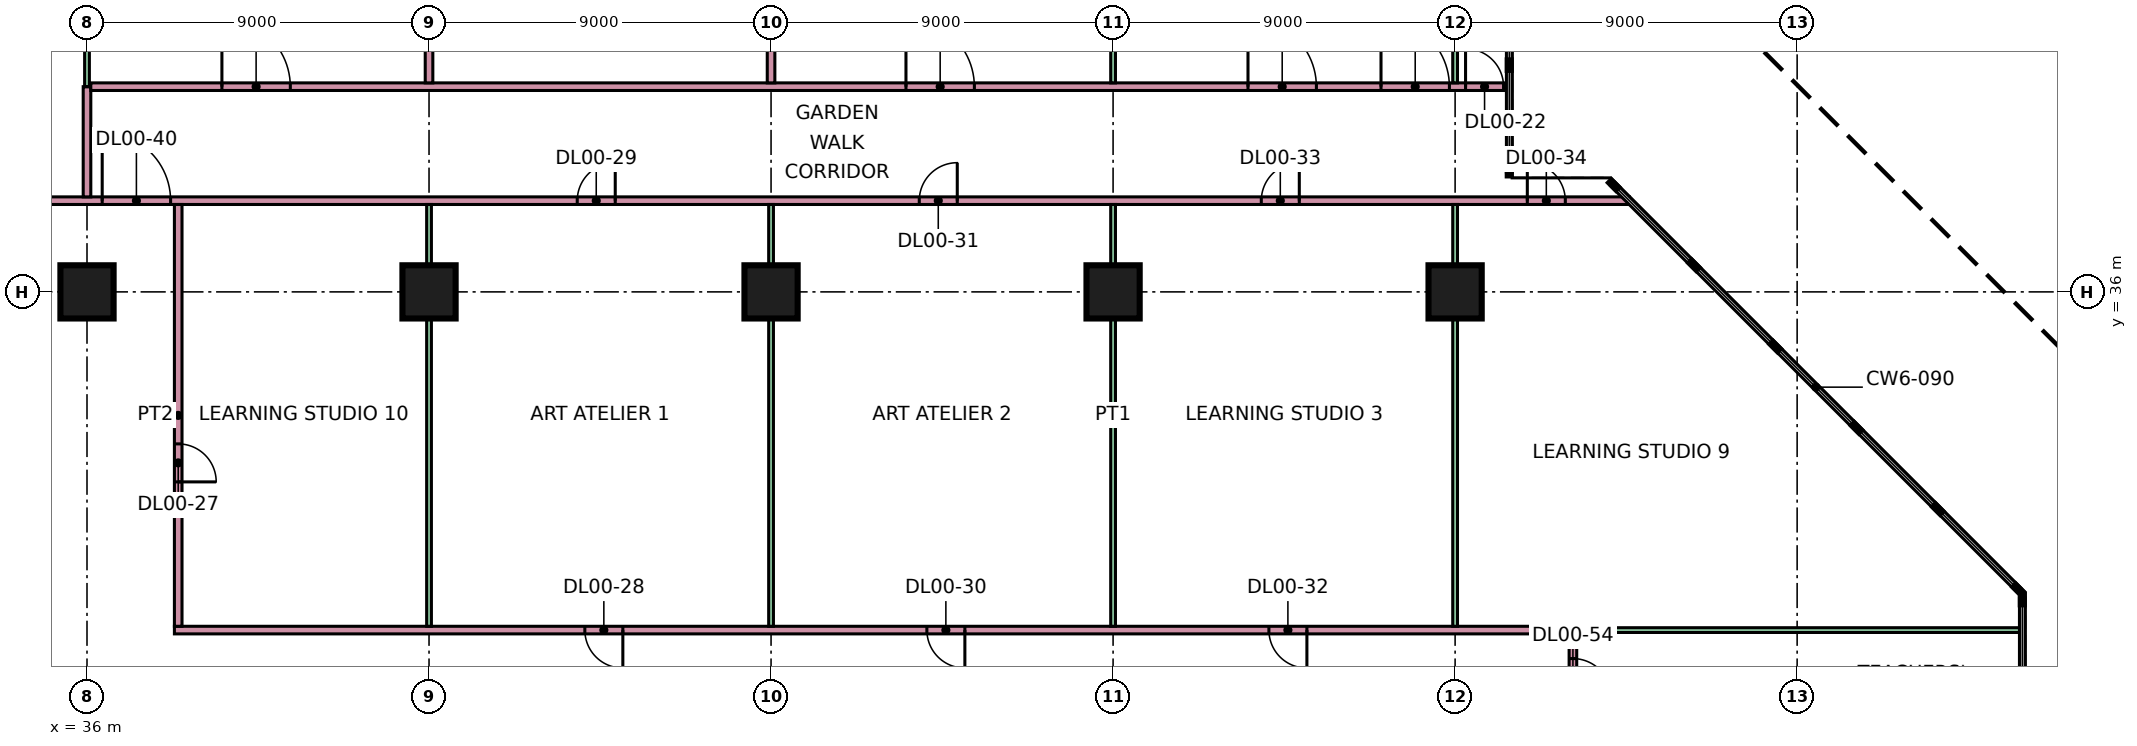
"""IFC4 building model, lengths in metres.
Left out: names, types, materials, properties, quantities, classifications, styles, units other than length and angle.
Written with IfcOpenShell. Run it as: python <this file> out.ifc"""

import sys

from ifc_helpers import new_model, si_unit, direction, frame, frame_2d, origin, origin_2d, place, context, subcontext, project, spatial, rectangle, extrude, element, fill, save


model = new_model("IFC4")
c1 = context("Model", 3, precision=1e-05, world=origin(), true_north=direction((0.0, 1.0)))
c2 = subcontext(c1, "Body", "Model", "MODEL_VIEW")
j1 = project(units=[si_unit("LENGTHUNIT", "METRE"), si_unit("PLANEANGLEUNIT", "RADIAN")], contexts=[c1])
p1 = place(None, origin())
s1 = spatial("IfcSite", under=j1, at=p1, CompositionType="ELEMENT")
p2 = place(p1, origin())
s2 = spatial("IfcBuilding", under=s1, at=p2, CompositionType="ELEMENT")
p3 = place(p2, origin())
s3 = spatial("IfcBuildingStorey", under=s2, at=p3, CompositionType="ELEMENT", Elevation=0.0)
for number, where, z_axis, x_axis in (
    (1, (36.0, 36.0, 0.0), (0.0, 0.0, 1.0), (1.0, 0.0, 0.0)),
    (2, (45.0, 36.0, 0.0), (0.0, 0.0, 1.0), (1.0, 0.0, 0.0)),
    (3, (54.0, 36.0, 0.0), (0.0, 0.0, 1.0), (1.0, 0.0, 0.0)),
    (4, (63.0, 36.0, 0.0), (0.0, 0.0, 1.0), (1.0, 0.0, 0.0)),
    (5, (72.0, 36.0, 0.0), (0.0, 0.0, 1.0), (1.0, 0.0, 0.0)),
):
    element("IfcColumn", number, at=place(p3, frame(where, z_axis=z_axis, x_axis=x_axis)), inside=s3, PredefinedType="COLUMN", context=c2, shape_type="SweptSolid", body=[
        extrude(rectangle(XDim=1.4, YDim=1.4, at=origin_2d()), origin(), (0.0, 0.0, 1.0), 7.2),
    ])
p4 = place(p3, frame((27.0, 38.4, 0.0), z_axis=(0.0, 0.0, 1.0), x_axis=(1.0, 0.0, 0.0)))
e6 = element("IfcWall", 6, at=p4, inside=s3, PredefinedType="PARTITIONING", context=c2, shape_type="SweptSolid", body=[
    extrude(rectangle(XDim=49.586, YDim=0.2, at=frame_2d((24.793, 0.0))), origin(), (0.0, 0.0, 1.0), 6.8),
])
p5 = place(p4, frame((21.9, 0.0, 0.0)))
e7 = element("IfcOpeningElement", 7, at=p5, cuts=e6, PredefinedType="OPENING", context=c2, shape_type="SweptSolid", body=[
    extrude(rectangle(XDim=1.0, YDim=2.1, at=frame_2d((0.5, 1.05))), frame((0.0, 0.11, 0.0), z_axis=(0.0, -1.0, 0.0), x_axis=(1.0, 0.0, 0.0)), (0.0, 0.0, 1.0), 0.22),
])
p6 = place(p4, frame((30.9, 0.0, 0.0)))
e8 = element("IfcOpeningElement", 8, at=p6, cuts=e6, PredefinedType="OPENING", context=c2, shape_type="SweptSolid", body=[
    extrude(rectangle(XDim=1.0, YDim=2.1, at=frame_2d((0.5, 1.05))), frame((0.0, 0.11, 0.0), z_axis=(0.0, -1.0, 0.0), x_axis=(1.0, 0.0, 0.0)), (0.0, 0.0, 1.0), 0.22),
])
p7 = place(p4, frame((39.9, 0.0, 0.0)))
e9 = element("IfcOpeningElement", 9, at=p7, cuts=e6, PredefinedType="OPENING", context=c2, shape_type="SweptSolid", body=[
    extrude(rectangle(XDim=1.0, YDim=2.1, at=frame_2d((0.5, 1.05))), frame((0.0, 0.11, 0.0), z_axis=(0.0, -1.0, 0.0), x_axis=(1.0, 0.0, 0.0)), (0.0, 0.0, 1.0), 0.22),
])
p8 = place(p4, frame((46.9, 0.0, 0.0)))
e10 = element("IfcOpeningElement", 10, at=p8, cuts=e6, PredefinedType="OPENING", context=c2, shape_type="SweptSolid", body=[
    extrude(rectangle(XDim=1.0, YDim=2.1, at=frame_2d((0.5, 1.05))), frame((0.0, 0.11, 0.0), z_axis=(0.0, -1.0, 0.0), x_axis=(1.0, 0.0, 0.0)), (0.0, 0.0, 1.0), 0.22),
])
p9 = place(p4, frame((9.4, 0.0, 0.0)))
e11 = element("IfcOpeningElement", 11, at=p9, cuts=e6, PredefinedType="OPENING", context=c2, shape_type="SweptSolid", body=[
    extrude(rectangle(XDim=1.8, YDim=2.1, at=frame_2d((0.9, 1.05))), frame((0.0, 0.11, 0.0), z_axis=(0.0, -1.0, 0.0), x_axis=(1.0, 0.0, 0.0)), (0.0, 0.0, 1.0), 0.22),
])
p10 = place(p3, frame((36.0, 38.5, 0.0), z_axis=(0.0, 0.0, 1.0), x_axis=(0.0, 1.0, 0.0)))
e12 = element("IfcWall", 12, at=p10, inside=s3, PredefinedType="PARTITIONING", context=c2, shape_type="SweptSolid", body=[
    extrude(rectangle(XDim=2.9, YDim=0.2, at=frame_2d((1.45, 0.0))), origin(), (0.0, 0.0, 1.0), 6.8),
])
p11 = place(p3, frame((36.0, 41.4, 0.0), z_axis=(0.0, 0.0, 1.0), x_axis=(0.0, 1.0, 0.0)))
e13 = element("IfcWall", 13, at=p11, inside=s3, PredefinedType="PARTITIONING", context=c2, shape_type="SweptSolid", body=[
    extrude(rectangle(XDim=32.025, YDim=0.125, at=frame_2d((16.013, 0.0))), origin(), (0.0, 0.0, 1.0), 6.8),
])
p12 = place(p3, frame((36.1, 41.4, 0.0), z_axis=(0.0, 0.0, 1.0), x_axis=(1.0, 0.0, 0.0)))
e14 = element("IfcWall", 14, at=p12, inside=s3, PredefinedType="PARTITIONING", context=c2, shape_type="SweptSolid", body=[
    extrude(rectangle(XDim=37.325, YDim=0.2, at=frame_2d((18.663, 0.0))), origin(), (0.0, 0.0, 1.0), 6.8),
])
p13 = place(p12, frame((3.45, 0.0, 0.0)))
e15 = element("IfcOpeningElement", 15, at=p13, cuts=e14, PredefinedType="OPENING", context=c2, shape_type="SweptSolid", body=[
    extrude(rectangle(XDim=1.8, YDim=2.1, at=frame_2d((0.9, 1.05))), frame((0.0, 0.11, 0.0), z_axis=(0.0, -1.0, 0.0), x_axis=(1.0, 0.0, 0.0)), (0.0, 0.0, 1.0), 0.22),
])
p14 = place(p12, frame((21.45, 0.0, 0.0)))
e16 = element("IfcOpeningElement", 16, at=p14, cuts=e14, PredefinedType="OPENING", context=c2, shape_type="SweptSolid", body=[
    extrude(rectangle(XDim=1.8, YDim=2.1, at=frame_2d((0.9, 1.05))), frame((0.0, 0.11, 0.0), z_axis=(0.0, -1.0, 0.0), x_axis=(1.0, 0.0, 0.0)), (0.0, 0.0, 1.0), 0.22),
])
p15 = place(p12, frame((30.45, 0.0, 0.0)))
e17 = element("IfcOpeningElement", 17, at=p15, cuts=e14, PredefinedType="OPENING", context=c2, shape_type="SweptSolid", body=[
    extrude(rectangle(XDim=1.8, YDim=2.1, at=frame_2d((0.9, 1.05))), frame((0.0, 0.11, 0.0), z_axis=(0.0, -1.0, 0.0), x_axis=(1.0, 0.0, 0.0)), (0.0, 0.0, 1.0), 0.22),
])
p16 = place(p12, frame((33.95, 0.0, 0.0)))
e18 = element("IfcOpeningElement", 18, at=p16, cuts=e14, PredefinedType="OPENING", context=c2, shape_type="SweptSolid", body=[
    extrude(rectangle(XDim=1.8, YDim=2.1, at=frame_2d((0.9, 1.05))), frame((0.0, 0.11, 0.0), z_axis=(0.0, -1.0, 0.0), x_axis=(1.0, 0.0, 0.0)), (0.0, 0.0, 1.0), 0.22),
])
p17 = place(p12, frame((36.175, 0.0, 0.0)))
e19 = element("IfcOpeningElement", 19, at=p17, cuts=e14, PredefinedType="OPENING", context=c2, shape_type="SweptSolid", body=[
    extrude(rectangle(XDim=1.0, YDim=2.1, at=frame_2d((0.5, 1.05))), frame((0.0, 0.11, 0.0), z_axis=(0.0, -1.0, 0.0), x_axis=(1.0, 0.0, 0.0)), (0.0, 0.0, 1.0), 0.22),
])
p18 = place(p3, frame((38.3, 27.1, 0.0), z_axis=(0.0, 0.0, 1.0), x_axis=(1.0, 0.0, 0.0)))
e20 = element("IfcWall", 20, at=p18, inside=s3, PredefinedType="PARTITIONING", context=c2, shape_type="SweptSolid", body=[
    extrude(rectangle(XDim=36.8, YDim=0.2, at=frame_2d((18.4, 0.0))), origin(), (0.0, 0.0, 1.0), 6.8),
])
p19 = place(p18, frame((10.8, 0.0, 0.0)))
e21 = element("IfcOpeningElement", 21, at=p19, cuts=e20, PredefinedType="OPENING", context=c2, shape_type="SweptSolid", body=[
    extrude(rectangle(XDim=1.0, YDim=2.1, at=frame_2d((0.5, 1.05))), frame((0.0, 0.11, 0.0), z_axis=(0.0, -1.0, 0.0), x_axis=(1.0, 0.0, 0.0)), (0.0, 0.0, 1.0), 0.22),
])
p20 = place(p18, frame((19.8, 0.0, 0.0)))
e22 = element("IfcOpeningElement", 22, at=p20, cuts=e20, PredefinedType="OPENING", context=c2, shape_type="SweptSolid", body=[
    extrude(rectangle(XDim=1.0, YDim=2.1, at=frame_2d((0.5, 1.05))), frame((0.0, 0.11, 0.0), z_axis=(0.0, -1.0, 0.0), x_axis=(1.0, 0.0, 0.0)), (0.0, 0.0, 1.0), 0.22),
])
p21 = place(p18, frame((28.8, 0.0, 0.0)))
e23 = element("IfcOpeningElement", 23, at=p21, cuts=e20, PredefinedType="OPENING", context=c2, shape_type="SweptSolid", body=[
    extrude(rectangle(XDim=1.0, YDim=2.1, at=frame_2d((0.5, 1.05))), frame((0.0, 0.11, 0.0), z_axis=(0.0, -1.0, 0.0), x_axis=(1.0, 0.0, 0.0)), (0.0, 0.0, 1.0), 0.22),
])
p22 = place(p3, frame((38.4, 27.2, 0.0), z_axis=(0.0, 0.0, 1.0), x_axis=(0.0, 1.0, 0.0)))
e24 = element("IfcWall", 24, at=p22, inside=s3, PredefinedType="PARTITIONING", context=c2, shape_type="SweptSolid", body=[
    extrude(rectangle(XDim=11.1, YDim=0.2, at=frame_2d((5.55, 0.0))), origin(), (0.0, 0.0, 1.0), 6.8),
])
p23 = place(p22, frame((3.8, 0.0, 0.0)))
e25 = element("IfcOpeningElement", 25, at=p23, cuts=e24, PredefinedType="OPENING", context=c2, shape_type="SweptSolid", body=[
    extrude(rectangle(XDim=1.0, YDim=2.1, at=frame_2d((0.5, 1.05))), frame((0.0, 0.11, 0.0), z_axis=(0.0, -1.0, 0.0), x_axis=(1.0, 0.0, 0.0)), (0.0, 0.0, 1.0), 0.22),
])
p24 = place(p3, frame((45.0, 27.2, 0.0), z_axis=(0.0, 0.0, 1.0), x_axis=(0.0, 1.0, 0.0)))
e26 = element("IfcWall", 26, at=p24, inside=s3, PredefinedType="PARTITIONING", context=c2, shape_type="SweptSolid", body=[
    extrude(rectangle(XDim=11.1, YDim=0.125, at=frame_2d((5.55, 0.0))), origin(), (0.0, 0.0, 1.0), 6.8),
])
p25 = place(p3, frame((45.0, 41.5, 0.0), z_axis=(0.0, 0.0, 1.0), x_axis=(0.0, 1.0, 0.0)))
e27 = element("IfcWall", 27, at=p25, inside=s3, PredefinedType="PARTITIONING", context=c2, shape_type="SweptSolid", body=[
    extrude(rectangle(XDim=31.925, YDim=0.2, at=frame_2d((15.962, 0.0))), origin(), (0.0, 0.0, 1.0), 6.8),
])
p26 = place(p25, frame((14.975, 0.0, 0.0)))
e28 = element("IfcOpeningElement", 28, at=p26, cuts=e27, PredefinedType="OPENING", context=c2, shape_type="SweptSolid", body=[
    extrude(rectangle(XDim=1.8, YDim=2.1, at=frame_2d((0.9, 1.05))), frame((0.0, 0.11, 0.0), z_axis=(0.0, -1.0, 0.0), x_axis=(1.0, 0.0, 0.0)), (0.0, 0.0, 1.0), 0.22),
])
p27 = place(p3, frame((54.0, 27.2, 0.0), z_axis=(0.0, 0.0, 1.0), x_axis=(0.0, 1.0, 0.0)))
e29 = element("IfcWall", 29, at=p27, inside=s3, PredefinedType="PARTITIONING", context=c2, shape_type="SweptSolid", body=[
    extrude(rectangle(XDim=11.1, YDim=0.125, at=frame_2d((5.55, 0.0))), origin(), (0.0, 0.0, 1.0), 6.8),
])
p28 = place(p3, frame((54.0, 41.5, 0.0), z_axis=(0.0, 0.0, 1.0), x_axis=(0.0, 1.0, 0.0)))
e30 = element("IfcWall", 30, at=p28, inside=s3, PredefinedType="PARTITIONING", context=c2, shape_type="SweptSolid", body=[
    extrude(rectangle(XDim=31.851, YDim=0.2, at=frame_2d((15.926, 0.0))), origin(), (0.0, 0.0, 1.0), 6.8),
])
p29 = place(p28, frame((15.05, 0.0, 0.0)))
e31 = element("IfcOpeningElement", 31, at=p29, cuts=e30, PredefinedType="OPENING", context=c2, shape_type="SweptSolid", body=[
    extrude(rectangle(XDim=1.8, YDim=2.1, at=frame_2d((0.9, 1.05))), frame((0.0, 0.11, 0.0), z_axis=(0.0, -1.0, 0.0), x_axis=(1.0, 0.0, 0.0)), (0.0, 0.0, 1.0), 0.22),
])
p30 = place(p3, frame((63.0, 27.2, 0.0), z_axis=(0.0, 0.0, 1.0), x_axis=(0.0, 1.0, 0.0)))
e32 = element("IfcWall", 32, at=p30, inside=s3, PredefinedType="PARTITIONING", context=c2, shape_type="SweptSolid", body=[
    extrude(rectangle(XDim=11.1, YDim=0.125, at=frame_2d((5.55, 0.0))), origin(), (0.0, 0.0, 1.0), 6.8),
])
p31 = place(p3, frame((63.0, 41.5, 0.0), z_axis=(0.0, 0.0, 1.0), x_axis=(0.0, 1.0, 0.0)))
e33 = element("IfcWall", 33, at=p31, inside=s3, PredefinedType="PARTITIONING", context=c2, shape_type="SweptSolid", body=[
    extrude(rectangle(XDim=31.925, YDim=0.125, at=frame_2d((15.962, 0.0))), origin(), (0.0, 0.0, 1.0), 6.8),
])
p32 = place(p3, frame((72.0, 27.2, 0.0), z_axis=(0.0, 0.0, 1.0), x_axis=(0.0, 1.0, 0.0)))
e34 = element("IfcWall", 34, at=p32, inside=s3, PredefinedType="PARTITIONING", context=c2, shape_type="SweptSolid", body=[
    extrude(rectangle(XDim=11.1, YDim=0.125, at=frame_2d((5.55, 0.0))), origin(), (0.0, 0.0, 1.0), 6.8),
])
p33 = place(p3, frame((72.0, 41.5, 0.0), z_axis=(0.0, 0.0, 1.0), x_axis=(0.0, 1.0, 0.0)))
e35 = element("IfcWall", 35, at=p33, inside=s3, PredefinedType="PARTITIONING", context=c2, shape_type="SweptSolid", body=[
    extrude(rectangle(XDim=31.925, YDim=0.125, at=frame_2d((15.962, 0.0))), origin(), (0.0, 0.0, 1.0), 6.8),
])
p34 = place(p3, frame((75.1, -3.0, 0.0), z_axis=(0.0, 0.0, 1.0), x_axis=(0.0, 1.0, 0.0)))
e36 = element("IfcWall", 36, at=p34, inside=s3, PredefinedType="PARTITIONING", context=c2, shape_type="SweptSolid", body=[
    extrude(rectangle(XDim=30.0, YDim=0.2, at=frame_2d((15.0, 0.0))), origin(), (0.0, 0.0, 1.0), 6.8),
])
p35 = place(p34, frame((0.55, 0.0, 0.0)))
e37 = element("IfcOpeningElement", 37, at=p35, cuts=e36, PredefinedType="OPENING", context=c2, shape_type="SweptSolid", body=[
    extrude(rectangle(XDim=1.0, YDim=2.1, at=frame_2d((0.5, 1.05))), frame((0.0, 0.11, 0.0), z_axis=(0.0, -1.0, 0.0), x_axis=(1.0, 0.0, 0.0)), (0.0, 0.0, 1.0), 0.22),
])
p36 = place(p34, frame((8.4, 0.0, 0.0)))
e38 = element("IfcOpeningElement", 38, at=p36, cuts=e36, PredefinedType="OPENING", context=c2, shape_type="SweptSolid", body=[
    extrude(rectangle(XDim=1.0, YDim=2.1, at=frame_2d((0.5, 1.05))), frame((0.0, 0.11, 0.0), z_axis=(0.0, -1.0, 0.0), x_axis=(1.0, 0.0, 0.0)), (0.0, 0.0, 1.0), 0.22),
])
p37 = place(p34, frame((22.25, 0.0, 0.0)))
e39 = element("IfcOpeningElement", 39, at=p37, cuts=e36, PredefinedType="OPENING", context=c2, shape_type="SweptSolid", body=[
    extrude(rectangle(XDim=1.0, YDim=2.1, at=frame_2d((0.5, 1.05))), frame((0.0, 0.11, 0.0), z_axis=(0.0, -1.0, 0.0), x_axis=(1.0, 0.0, 0.0)), (0.0, 0.0, 1.0), 0.22),
])
p38 = place(p34, frame((28.35, 0.0, 0.0)))
e40 = element("IfcOpeningElement", 40, at=p38, cuts=e36, PredefinedType="OPENING", context=c2, shape_type="SweptSolid", body=[
    extrude(rectangle(XDim=1.0, YDim=2.1, at=frame_2d((0.5, 1.05))), frame((0.0, 0.11, 0.0), z_axis=(0.0, -1.0, 0.0), x_axis=(1.0, 0.0, 0.0)), (0.0, 0.0, 1.0), 0.22),
])
p39 = place(p34, frame((16.25, 0.0, 0.0)))
e41 = element("IfcOpeningElement", 41, at=p39, cuts=e36, PredefinedType="OPENING", context=c2, shape_type="SweptSolid", body=[
    extrude(rectangle(XDim=1.8, YDim=2.1, at=frame_2d((0.9, 1.05))), frame((0.0, 0.11, 0.0), z_axis=(0.0, -1.0, 0.0), x_axis=(1.0, 0.0, 0.0)), (0.0, 0.0, 1.0), 0.22),
])
p40 = place(p3, frame((75.1, 27.1, 0.0), z_axis=(0.0, 0.0, 1.0), x_axis=(1.0, 0.0, 0.0)))
e42 = element("IfcWall", 42, at=p40, inside=s3, PredefinedType="PARTITIONING", context=c2, shape_type="SweptSolid", body=[
    extrude(rectangle(XDim=11.825, YDim=0.125, at=frame_2d((5.913, 0.0))), origin(), (0.0, 0.0, 1.0), 6.8),
])
p41 = place(p13, origin())
e43 = element("IfcDoor", 43, at=p41, inside=s3, OperationType="DOUBLE_DOOR_SINGLE_SWING", PredefinedType="DOOR", context=c2, shape_type="SweptSolid", body=[
    extrude(rectangle(XDim=1.8, YDim=2.1, at=frame_2d((0.9, 1.05))), frame((0.0, 0.025, 0.0), z_axis=(0.0, -1.0, 0.0), x_axis=(1.0, 0.0, 0.0)), (0.0, 0.0, 1.0), 0.05),
])
fill(e15, e43)
p42 = place(p14, origin())
e44 = element("IfcDoor", 44, at=p42, inside=s3, OperationType="DOUBLE_DOOR_SINGLE_SWING", PredefinedType="DOOR", context=c2, shape_type="SweptSolid", body=[
    extrude(rectangle(XDim=1.8, YDim=2.1, at=frame_2d((0.9, 1.05))), frame((0.0, 0.025, 0.0), z_axis=(0.0, -1.0, 0.0), x_axis=(1.0, 0.0, 0.0)), (0.0, 0.0, 1.0), 0.05),
])
fill(e16, e44)
p43 = place(p15, origin())
e45 = element("IfcDoor", 45, at=p43, inside=s3, OperationType="DOUBLE_DOOR_SINGLE_SWING", PredefinedType="DOOR", context=c2, shape_type="SweptSolid", body=[
    extrude(rectangle(XDim=1.8, YDim=2.1, at=frame_2d((0.9, 1.05))), frame((0.0, 0.025, 0.0), z_axis=(0.0, -1.0, 0.0), x_axis=(1.0, 0.0, 0.0)), (0.0, 0.0, 1.0), 0.05),
])
fill(e17, e45)
p44 = place(p16, origin())
e46 = element("IfcDoor", 46, at=p44, inside=s3, OperationType="DOUBLE_DOOR_SINGLE_SWING", PredefinedType="DOOR", context=c2, shape_type="SweptSolid", body=[
    extrude(rectangle(XDim=1.8, YDim=2.1, at=frame_2d((0.9, 1.05))), frame((0.0, 0.025, 0.0), z_axis=(0.0, -1.0, 0.0), x_axis=(1.0, 0.0, 0.0)), (0.0, 0.0, 1.0), 0.05),
])
fill(e18, e46)
p45 = place(p17, origin())
e47 = element("IfcDoor", 47, at=p45, inside=s3, OperationType="SINGLE_SWING_LEFT", PredefinedType="DOOR", context=c2, shape_type="SweptSolid", body=[
    extrude(rectangle(XDim=1.0, YDim=2.1, at=frame_2d((0.5, 1.05))), frame((0.0, 0.025, 0.0), z_axis=(0.0, -1.0, 0.0), x_axis=(1.0, 0.0, 0.0)), (0.0, 0.0, 1.0), 0.05),
])
fill(e19, e47)
p46 = place(p23, frame((1.0, 0.0, 0.0), z_axis=(0.0, 0.0, 1.0), x_axis=(-1.0, 0.0, 0.0)))
e48 = element("IfcDoor", 48, at=p46, inside=s3, OperationType="SINGLE_SWING_LEFT", PredefinedType="DOOR", context=c2, shape_type="SweptSolid", body=[
    extrude(rectangle(XDim=1.0, YDim=2.1, at=frame_2d((0.5, 1.05))), frame((0.0, 0.025, 0.0), z_axis=(0.0, -1.0, 0.0), x_axis=(1.0, 0.0, 0.0)), (0.0, 0.0, 1.0), 0.05),
])
fill(e25, e48)
p47 = place(p19, origin())
e49 = element("IfcDoor", 49, at=p47, inside=s3, OperationType="SINGLE_SWING_RIGHT", PredefinedType="DOOR", context=c2, shape_type="SweptSolid", body=[
    extrude(rectangle(XDim=1.0, YDim=2.1, at=frame_2d((0.5, 1.05))), frame((0.0, 0.025, 0.0), z_axis=(0.0, -1.0, 0.0), x_axis=(1.0, 0.0, 0.0)), (0.0, 0.0, 1.0), 0.05),
])
fill(e21, e49)
p48 = place(p5, frame((1.0, 0.0, 0.0), z_axis=(0.0, 0.0, 1.0), x_axis=(-1.0, 0.0, 0.0)))
e50 = element("IfcDoor", 50, at=p48, inside=s3, OperationType="SINGLE_SWING_RIGHT", PredefinedType="DOOR", context=c2, shape_type="SweptSolid", body=[
    extrude(rectangle(XDim=1.0, YDim=2.1, at=frame_2d((0.5, 1.05))), frame((0.0, 0.025, 0.0), z_axis=(0.0, -1.0, 0.0), x_axis=(1.0, 0.0, 0.0)), (0.0, 0.0, 1.0), 0.05),
])
fill(e7, e50)
p49 = place(p20, origin())
e51 = element("IfcDoor", 51, at=p49, inside=s3, OperationType="SINGLE_SWING_RIGHT", PredefinedType="DOOR", context=c2, shape_type="SweptSolid", body=[
    extrude(rectangle(XDim=1.0, YDim=2.1, at=frame_2d((0.5, 1.05))), frame((0.0, 0.025, 0.0), z_axis=(0.0, -1.0, 0.0), x_axis=(1.0, 0.0, 0.0)), (0.0, 0.0, 1.0), 0.05),
])
fill(e22, e51)
p50 = place(p6, frame((1.0, 0.0, 0.0), z_axis=(0.0, 0.0, 1.0), x_axis=(-1.0, 0.0, 0.0)))
e52 = element("IfcDoor", 52, at=p50, inside=s3, OperationType="SINGLE_SWING_RIGHT", PredefinedType="DOOR", context=c2, shape_type="SweptSolid", body=[
    extrude(rectangle(XDim=1.0, YDim=2.1, at=frame_2d((0.5, 1.05))), frame((0.0, 0.025, 0.0), z_axis=(0.0, -1.0, 0.0), x_axis=(1.0, 0.0, 0.0)), (0.0, 0.0, 1.0), 0.05),
])
fill(e8, e52)
p51 = place(p21, origin())
e53 = element("IfcDoor", 53, at=p51, inside=s3, OperationType="SINGLE_SWING_RIGHT", PredefinedType="DOOR", context=c2, shape_type="SweptSolid", body=[
    extrude(rectangle(XDim=1.0, YDim=2.1, at=frame_2d((0.5, 1.05))), frame((0.0, 0.025, 0.0), z_axis=(0.0, -1.0, 0.0), x_axis=(1.0, 0.0, 0.0)), (0.0, 0.0, 1.0), 0.05),
])
fill(e23, e53)
p52 = place(p7, frame((1.0, 0.0, 0.0), z_axis=(0.0, 0.0, 1.0), x_axis=(-1.0, 0.0, 0.0)))
e54 = element("IfcDoor", 54, at=p52, inside=s3, OperationType="SINGLE_SWING_RIGHT", PredefinedType="DOOR", context=c2, shape_type="SweptSolid", body=[
    extrude(rectangle(XDim=1.0, YDim=2.1, at=frame_2d((0.5, 1.05))), frame((0.0, 0.025, 0.0), z_axis=(0.0, -1.0, 0.0), x_axis=(1.0, 0.0, 0.0)), (0.0, 0.0, 1.0), 0.05),
])
fill(e9, e54)
p53 = place(p8, origin())
e55 = element("IfcDoor", 55, at=p53, inside=s3, OperationType="SINGLE_SWING_LEFT", PredefinedType="DOOR", context=c2, shape_type="SweptSolid", body=[
    extrude(rectangle(XDim=1.0, YDim=2.1, at=frame_2d((0.5, 1.05))), frame((0.0, 0.025, 0.0), z_axis=(0.0, -1.0, 0.0), x_axis=(1.0, 0.0, 0.0)), (0.0, 0.0, 1.0), 0.05),
])
fill(e10, e55)
p54 = place(p9, origin())
e56 = element("IfcDoor", 56, at=p54, inside=s3, OperationType="DOUBLE_DOOR_SINGLE_SWING", PredefinedType="DOOR", context=c2, shape_type="SweptSolid", body=[
    extrude(rectangle(XDim=1.8, YDim=2.1, at=frame_2d((0.9, 1.05))), frame((0.0, 0.025, 0.0), z_axis=(0.0, -1.0, 0.0), x_axis=(1.0, 0.0, 0.0)), (0.0, 0.0, 1.0), 0.05),
])
fill(e11, e56)
p55 = place(p38, frame((1.0, 0.0, 0.0), z_axis=(0.0, 0.0, 1.0), x_axis=(-1.0, 0.0, 0.0)))
e57 = element("IfcDoor", 57, at=p55, inside=s3, OperationType="SINGLE_SWING_LEFT", PredefinedType="DOOR", context=c2, shape_type="SweptSolid", body=[
    extrude(rectangle(XDim=1.0, YDim=2.1, at=frame_2d((0.5, 1.05))), frame((0.0, 0.025, 0.0), z_axis=(0.0, -1.0, 0.0), x_axis=(1.0, 0.0, 0.0)), (0.0, 0.0, 1.0), 0.05),
])
fill(e40, e57)
save(model, sys.argv[1])
